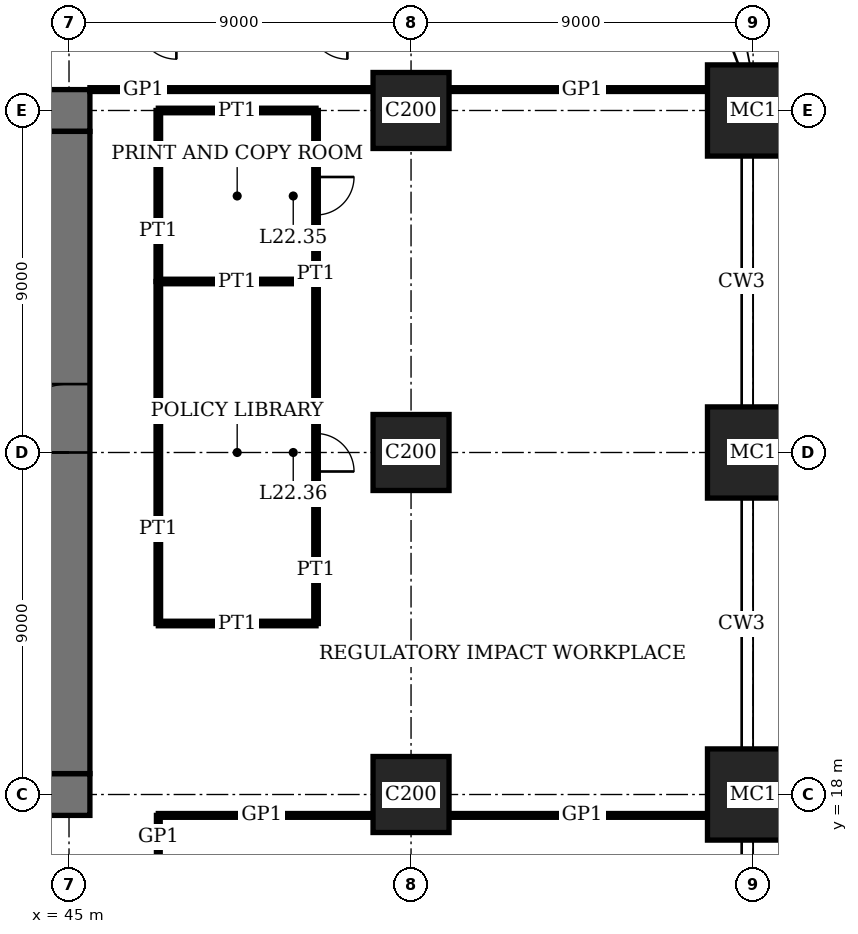
"""IFC4 building model, lengths in metres.
Left out: names, types, materials, properties, quantities, classifications, styles, units other than length and angle.
Written with IfcOpenShell. Run it as: python <this file> out.ifc"""

import sys

from ifc_helpers import new_model, si_unit, direction, frame, frame_2d, origin, origin_2d, place, context, subcontext, project, spatial, rectangle, extrude, element, fill, save


model = new_model("IFC4")
c1 = context("Model", 3, precision=1e-05, world=origin(), true_north=direction((0.0, 1.0)))
c2 = subcontext(c1, "Body", "Model", "MODEL_VIEW")
j1 = project(units=[si_unit("LENGTHUNIT", "METRE"), si_unit("PLANEANGLEUNIT", "RADIAN")], contexts=[c1])
p1 = place(None, origin())
s1 = spatial("IfcSite", under=j1, at=p1, CompositionType="ELEMENT")
p2 = place(p1, origin())
s2 = spatial("IfcBuilding", under=s1, at=p2, CompositionType="ELEMENT")
p3 = place(p2, frame((0.0, 0.0, 93.0)))
s3 = spatial("IfcBuildingStorey", under=s2, at=p3, CompositionType="ELEMENT", Elevation=93.0)
for number, where, z_axis, x_axis in (
    (1, (54.0, 18.0, 0.0), (0.0, 0.0, 1.0), (1.0, 0.0, 0.0)),
    (2, (54.0, 27.0, 0.0), (0.0, 0.0, 1.0), (1.0, 0.0, 0.0)),
    (3, (54.0, 36.0, 0.0), (0.0, 0.0, 1.0), (1.0, 0.0, 0.0)),
):
    element("IfcColumn", number, at=place(p3, frame(where, z_axis=z_axis, x_axis=x_axis)), inside=s3, PredefinedType="COLUMN", context=c2, shape_type="SweptSolid", body=[
        extrude(rectangle(XDim=2.0, YDim=2.0, at=origin_2d()), origin(), (0.0, 0.0, 1.0), 4.0),
    ])
for number, where, z_axis, x_axis in (
    (4, (63.0, 18.0, 0.0), (0.0, 0.0, 1.0), (1.0, 0.0, 0.0)),
    (5, (63.0, 27.0, 0.0), (0.0, 0.0, 1.0), (1.0, 0.0, 0.0)),
    (6, (63.0, 36.0, 0.0), (0.0, 0.0, 1.0), (1.0, 0.0, 0.0)),
):
    element("IfcColumn", number, at=place(p3, frame(where, z_axis=z_axis, x_axis=x_axis)), inside=s3, PredefinedType="COLUMN", context=c2, shape_type="SweptSolid", body=[
        extrude(rectangle(XDim=2.4, YDim=2.4, at=origin_2d()), origin(), (0.0, 0.0, 1.0), 4.0),
    ])
p4 = place(p3, frame((17.45, 18.0, 0.0), z_axis=(0.0, 0.0, 1.0), x_axis=(1.0, 0.0, 0.0)))
e7 = element("IfcWall", 7, at=p4, inside=s3, PredefinedType="SHEAR", context=c2, shape_type="SweptSolid", body=[
    extrude(rectangle(XDim=28.1, YDim=1.1, at=frame_2d((14.05, 0.0))), origin(), (0.0, 0.0, 1.0), 4.0),
])
p5 = place(p4, frame((11.55, 0.0, 0.0)))
e8 = element("IfcOpeningElement", 8, at=p5, cuts=e7, PredefinedType="OPENING", context=c2, shape_type="SweptSolid", body=[
    extrude(rectangle(XDim=1.0, YDim=2.4, at=frame_2d((0.5, 1.2))), frame((0.0, 0.56, 0.0), z_axis=(0.0, -1.0, 0.0), x_axis=(1.0, 0.0, 0.0)), (0.0, 0.0, 1.0), 1.12),
])
p6 = place(p4, frame((16.55, 0.0, 0.0)))
e9 = element("IfcOpeningElement", 9, at=p6, cuts=e7, PredefinedType="OPENING", context=c2, shape_type="SweptSolid", body=[
    extrude(rectangle(XDim=1.0, YDim=2.4, at=frame_2d((0.5, 1.2))), frame((0.0, 0.56, 0.0), z_axis=(0.0, -1.0, 0.0), x_axis=(1.0, 0.0, 0.0)), (0.0, 0.0, 1.0), 1.12),
])
p7 = place(p4, frame((20.0, 0.0, 0.0)))
e10 = element("IfcOpeningElement", 10, at=p7, cuts=e7, PredefinedType="OPENING", context=c2, shape_type="SweptSolid", body=[
    extrude(rectangle(XDim=1.1, YDim=2.4, at=frame_2d((0.55, 1.2))), frame((0.0, 0.56, 0.0), z_axis=(0.0, -1.0, 0.0), x_axis=(1.0, 0.0, 0.0)), (0.0, 0.0, 1.0), 1.12),
])
p8 = place(p4, frame((24.05, 0.0, 0.0)))
e11 = element("IfcOpeningElement", 11, at=p8, cuts=e7, PredefinedType="OPENING", context=c2, shape_type="SweptSolid", body=[
    extrude(rectangle(XDim=1.0, YDim=2.4, at=frame_2d((0.5, 1.2))), frame((0.0, 0.56, 0.0), z_axis=(0.0, -1.0, 0.0), x_axis=(1.0, 0.0, 0.0)), (0.0, 0.0, 1.0), 1.12),
])
p9 = place(p3, frame((45.55, 36.0, 0.0), z_axis=(0.0, 0.0, 1.0), x_axis=(-1.0, 0.0, 0.0)))
e12 = element("IfcWall", 12, at=p9, inside=s3, PredefinedType="SHEAR", context=c2, shape_type="SweptSolid", body=[
    extrude(rectangle(XDim=28.1, YDim=1.1, at=frame_2d((14.05, 0.0))), origin(), (0.0, 0.0, 1.0), 4.0),
])
p10 = place(p9, frame((11.55, 0.0, 0.0)))
e13 = element("IfcOpeningElement", 13, at=p10, cuts=e12, PredefinedType="OPENING", context=c2, shape_type="SweptSolid", body=[
    extrude(rectangle(XDim=1.0, YDim=2.4, at=frame_2d((0.5, 1.2))), frame((0.0, 0.56, 0.0), z_axis=(0.0, -1.0, 0.0), x_axis=(1.0, 0.0, 0.0)), (0.0, 0.0, 1.0), 1.12),
])
p11 = place(p9, frame((16.55, 0.0, 0.0)))
e14 = element("IfcOpeningElement", 14, at=p11, cuts=e12, PredefinedType="OPENING", context=c2, shape_type="SweptSolid", body=[
    extrude(rectangle(XDim=1.0, YDim=2.4, at=frame_2d((0.5, 1.2))), frame((0.0, 0.56, 0.0), z_axis=(0.0, -1.0, 0.0), x_axis=(1.0, 0.0, 0.0)), (0.0, 0.0, 1.0), 1.12),
])
p12 = place(p9, frame((20.0, 0.0, 0.0)))
e15 = element("IfcOpeningElement", 15, at=p12, cuts=e12, PredefinedType="OPENING", context=c2, shape_type="SweptSolid", body=[
    extrude(rectangle(XDim=1.1, YDim=2.4, at=frame_2d((0.55, 1.2))), frame((0.0, 0.56, 0.0), z_axis=(0.0, -1.0, 0.0), x_axis=(1.0, 0.0, 0.0)), (0.0, 0.0, 1.0), 1.12),
])
p13 = place(p9, frame((24.05, 0.0, 0.0)))
e16 = element("IfcOpeningElement", 16, at=p13, cuts=e12, PredefinedType="OPENING", context=c2, shape_type="SweptSolid", body=[
    extrude(rectangle(XDim=1.0, YDim=2.4, at=frame_2d((0.5, 1.2))), frame((0.0, 0.56, 0.0), z_axis=(0.0, -1.0, 0.0), x_axis=(1.0, 0.0, 0.0)), (0.0, 0.0, 1.0), 1.12),
])
p14 = place(p3, frame((45.0, 18.55, 0.0), z_axis=(0.0, 0.0, 1.0), x_axis=(0.0, 1.0, 0.0)))
e17 = element("IfcWall", 17, at=p14, inside=s3, PredefinedType="SHEAR", context=c2, shape_type="SweptSolid", body=[
    extrude(rectangle(XDim=16.9, YDim=1.1, at=frame_2d((8.45, 0.0))), origin(), (0.0, 0.0, 1.0), 4.0),
])
p15 = place(p14, frame((8.45, 0.0, 0.0)))
e18 = element("IfcOpeningElement", 18, at=p15, cuts=e17, PredefinedType="OPENING", context=c2, shape_type="SweptSolid", body=[
    extrude(rectangle(XDim=1.8, YDim=2.4, at=frame_2d((0.9, 1.2))), frame((0.0, 0.56, 0.0), z_axis=(0.0, -1.0, 0.0), x_axis=(1.0, 0.0, 0.0)), (0.0, 0.0, 1.0), 1.12),
])
p16 = place(p3, frame((47.35, 17.45, 0.0), z_axis=(0.0, 0.0, 1.0), x_axis=(1.0, 0.0, 0.0)))
e19 = element("IfcWall", 19, at=p16, inside=s3, PredefinedType="PARTITIONING", context=c2, shape_type="SweptSolid", body=[
    extrude(rectangle(XDim=5.65, YDim=0.1, at=frame_2d((2.825, 0.0))), origin(), (0.0, 0.0, 1.0), 3.75),
])
p17 = place(p3, frame((55.0, 17.45, 0.0), z_axis=(0.0, 0.0, 1.0), x_axis=(1.0, 0.0, 0.0)))
e20 = element("IfcWall", 20, at=p17, inside=s3, PredefinedType="PARTITIONING", context=c2, shape_type="SweptSolid", body=[
    extrude(rectangle(XDim=6.8, YDim=0.1, at=frame_2d((3.4, 0.0))), origin(), (0.0, 0.0, 1.0), 3.75),
])
for number, where, z_axis, x_axis in (
    (21, (47.35, 22.5, 0.0), (0.0, 0.0, 1.0), (1.0, 0.0, 0.0)),
    (22, (47.35, 31.5, 0.0), (0.0, 0.0, 1.0), (1.0, 0.0, 0.0)),
):
    element("IfcWall", number, at=place(p3, frame(where, z_axis=z_axis, x_axis=x_axis)), inside=s3, PredefinedType="PARTITIONING", context=c2, shape_type="SweptSolid", body=[
        extrude(rectangle(XDim=4.15, YDim=0.12, at=frame_2d((2.075, 0.0))), origin(), (0.0, 0.0, 1.0), 3.1),
    ])
p18 = place(p3, frame((47.35, 36.0, 0.0), z_axis=(0.0, 0.0, 1.0), x_axis=(1.0, 0.0, 0.0)))
e23 = element("IfcWall", 23, at=p18, inside=s3, PredefinedType="PARTITIONING", context=c2, shape_type="SweptSolid", body=[
    extrude(rectangle(XDim=4.15, YDim=0.12, at=frame_2d((2.075, 0.0))), origin(), (0.0, 0.0, 1.0), 3.05),
])
p19 = place(p3, frame((45.55, 36.55, 0.0), z_axis=(0.0, 0.0, 1.0), x_axis=(1.0, 0.0, 0.0)))
e24 = element("IfcWall", 24, at=p19, inside=s3, PredefinedType="PARTITIONING", context=c2, shape_type="SweptSolid", body=[
    extrude(rectangle(XDim=7.45, YDim=0.1, at=frame_2d((3.725, 0.0))), origin(), (0.0, 0.0, 1.0), 3.75),
])
p20 = place(p3, frame((55.0, 36.55, 0.0), z_axis=(0.0, 0.0, 1.0), x_axis=(1.0, 0.0, 0.0)))
e25 = element("IfcWall", 25, at=p20, inside=s3, PredefinedType="PARTITIONING", context=c2, shape_type="SweptSolid", body=[
    extrude(rectangle(XDim=6.8, YDim=0.1, at=frame_2d((3.4, 0.0))), origin(), (0.0, 0.0, 1.0), 3.75),
])
p21 = place(p3, frame((47.35, 31.5, 0.0), z_axis=(0.0, 0.0, 1.0), x_axis=(0.0, 1.0, 0.0)))
e26 = element("IfcWall", 26, at=p21, inside=s3, PredefinedType="PARTITIONING", context=c2, shape_type="SweptSolid", body=[
    extrude(rectangle(XDim=4.5, YDim=0.12, at=frame_2d((2.25, 0.0))), origin(), (0.0, 0.0, 1.0), 3.75),
])
p22 = place(p3, frame((47.35, 22.5, 0.0), z_axis=(0.0, 0.0, 1.0), x_axis=(0.0, 1.0, 0.0)))
e27 = element("IfcWall", 27, at=p22, inside=s3, PredefinedType="PARTITIONING", context=c2, shape_type="SweptSolid", body=[
    extrude(rectangle(XDim=9.0, YDim=0.12, at=frame_2d((4.5, 0.0))), origin(), (0.0, 0.0, 1.0), 3.75),
])
p23 = place(p3, frame((47.35, 15.65, 0.0), z_axis=(0.0, 0.0, 1.0), x_axis=(0.0, 1.0, 0.0)))
e28 = element("IfcWall", 28, at=p23, inside=s3, PredefinedType="PARTITIONING", context=c2, shape_type="SweptSolid", body=[
    extrude(rectangle(XDim=1.8, YDim=0.1, at=frame_2d((0.9, 0.0))), origin(), (0.0, 0.0, 1.0), 3.75),
])
p24 = place(p3, frame((51.5, 31.5, 0.0), z_axis=(0.0, 0.0, 1.0), x_axis=(0.0, 1.0, 0.0)))
e29 = element("IfcWall", 29, at=p24, inside=s3, PredefinedType="PARTITIONING", context=c2, shape_type="SweptSolid", body=[
    extrude(rectangle(XDim=4.5, YDim=0.12, at=frame_2d((2.25, 0.0))), origin(), (0.0, 0.0, 1.0), 3.75),
])
p25 = place(p24, frame((1.75, 0.0, 0.0)))
e30 = element("IfcOpeningElement", 30, at=p25, cuts=e29, PredefinedType="OPENING", context=c2, shape_type="SweptSolid", body=[
    extrude(rectangle(XDim=1.0, YDim=2.4, at=frame_2d((0.5, 1.2))), frame((0.0, 0.07, 0.0), z_axis=(0.0, -1.0, 0.0), x_axis=(1.0, 0.0, 0.0)), (0.0, 0.0, 1.0), 0.14),
])
p26 = place(p3, frame((51.5, 22.5, 0.0), z_axis=(0.0, 0.0, 1.0), x_axis=(0.0, 1.0, 0.0)))
e31 = element("IfcWall", 31, at=p26, inside=s3, PredefinedType="PARTITIONING", context=c2, shape_type="SweptSolid", body=[
    extrude(rectangle(XDim=9.0, YDim=0.12, at=frame_2d((4.5, 0.0))), origin(), (0.0, 0.0, 1.0), 3.75),
])
p27 = place(p26, frame((4.0, 0.0, 0.0)))
e32 = element("IfcOpeningElement", 32, at=p27, cuts=e31, PredefinedType="OPENING", context=c2, shape_type="SweptSolid", body=[
    extrude(rectangle(XDim=1.0, YDim=2.4, at=frame_2d((0.5, 1.2))), frame((0.0, 0.07, 0.0), z_axis=(0.0, -1.0, 0.0), x_axis=(1.0, 0.0, 0.0)), (0.0, 0.0, 1.0), 0.14),
])
p28 = place(p15, origin())
e33 = element("IfcDoor", 33, at=p28, inside=s3, OperationType="DOUBLE_DOOR_DOUBLE_SWING", PredefinedType="DOOR", context=c2, shape_type="SweptSolid", body=[
    extrude(rectangle(XDim=1.8, YDim=2.4, at=frame_2d((0.9, 1.2))), frame((0.0, 0.03, 0.0), z_axis=(0.0, -1.0, 0.0), x_axis=(1.0, 0.0, 0.0)), (0.0, 0.0, 1.0), 0.06),
    extrude(rectangle(XDim=0.04, YDim=2.4, at=frame_2d((0.02, 1.2))), frame((0.0, 0.55, 0.0), z_axis=(0.0, -1.0, 0.0), x_axis=(1.0, 0.0, 0.0)), (0.0, 0.0, 1.0), 1.1),
    extrude(rectangle(XDim=0.04, YDim=2.4, at=frame_2d((1.78, 1.2))), frame((0.0, 0.55, 0.0), z_axis=(0.0, -1.0, 0.0), x_axis=(1.0, 0.0, 0.0)), (0.0, 0.0, 1.0), 1.1),
    extrude(rectangle(XDim=1.8, YDim=0.04, at=frame_2d((0.9, 2.38))), frame((0.0, 0.55, 0.0), z_axis=(0.0, -1.0, 0.0), x_axis=(1.0, 0.0, 0.0)), (0.0, 0.0, 1.0), 1.1),
])
fill(e18, e33)
p29 = place(p25, origin())
e34 = element("IfcDoor", 34, at=p29, inside=s3, OperationType="SINGLE_SWING_RIGHT", PredefinedType="DOOR", context=c2, shape_type="SweptSolid", body=[
    extrude(rectangle(XDim=1.0, YDim=2.4, at=frame_2d((0.5, 1.2))), frame((0.0, 0.025, 0.0), z_axis=(0.0, -1.0, 0.0), x_axis=(1.0, 0.0, 0.0)), (0.0, 0.0, 1.0), 0.05),
])
fill(e30, e34)
p30 = place(p27, origin())
e35 = element("IfcDoor", 35, at=p30, inside=s3, OperationType="SINGLE_SWING_LEFT", PredefinedType="DOOR", context=c2, shape_type="SweptSolid", body=[
    extrude(rectangle(XDim=1.0, YDim=2.4, at=frame_2d((0.5, 1.2))), frame((0.0, 0.025, 0.0), z_axis=(0.0, -1.0, 0.0), x_axis=(1.0, 0.0, 0.0)), (0.0, 0.0, 1.0), 0.05),
])
fill(e32, e35)
save(model, sys.argv[1])
